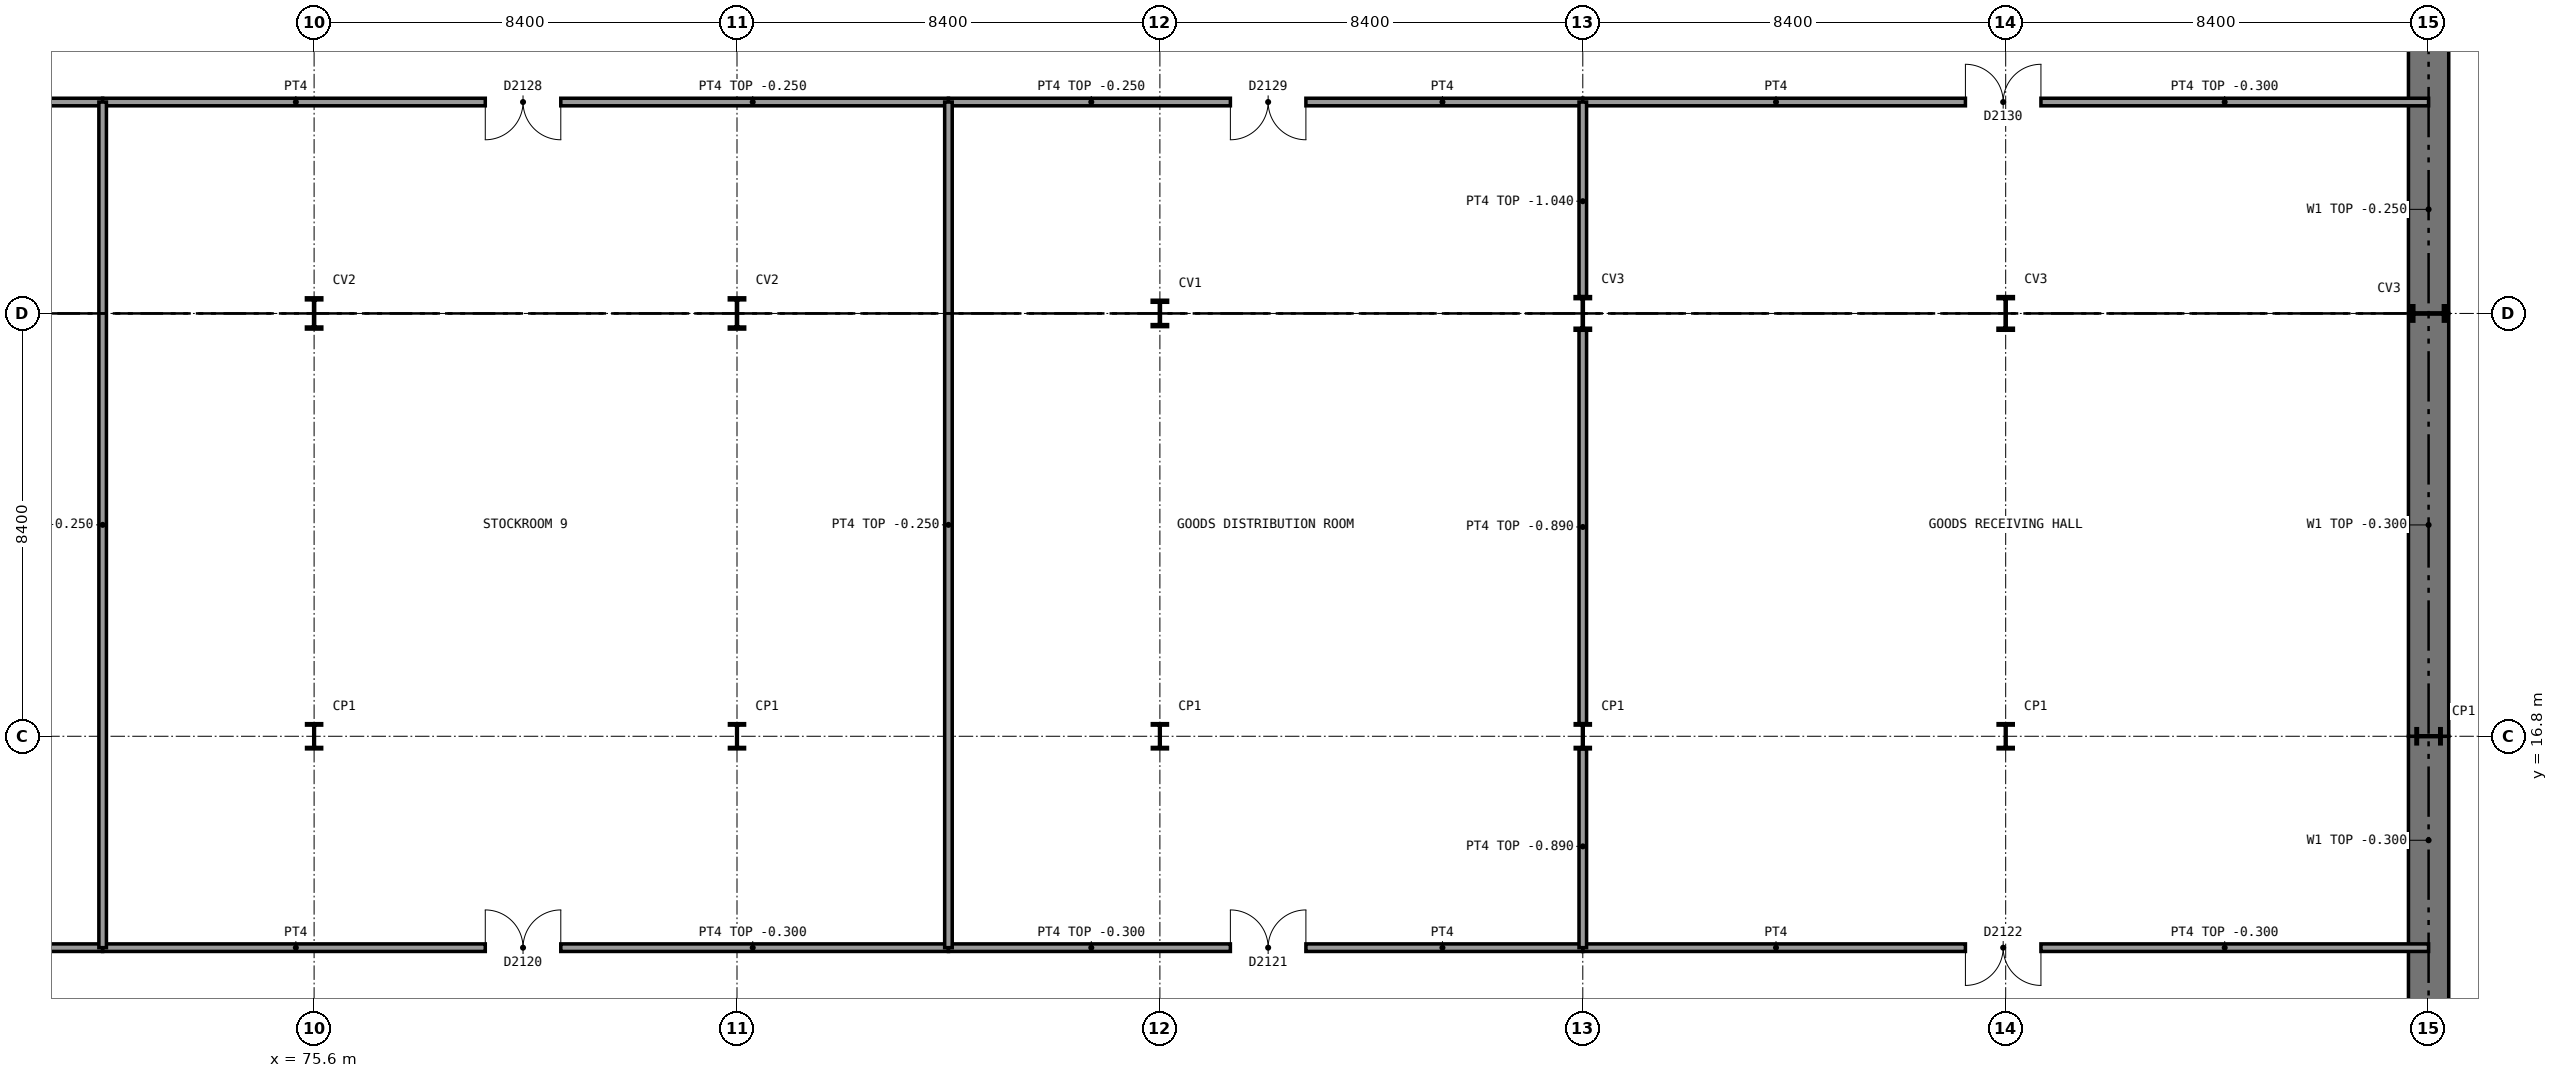
"""IFC4 building model, lengths in metres.
Left out: names, types, materials, properties, quantities, classifications, styles, units other than length and angle.
Written with IfcOpenShell. Run it as: python <this file> out.ifc"""

import sys

from ifc_helpers import new_model, si_unit, direction, frame, frame_2d, origin, origin_2d, place, context, subcontext, project, spatial, rectangle, i_section, extrude, element, fill, save


model = new_model("IFC4")
c1 = context("Model", 3, precision=1e-05, world=origin(), true_north=direction((0.0, 1.0)))
c2 = subcontext(c1, "Body", "Model", "MODEL_VIEW")
j1 = project(units=[si_unit("LENGTHUNIT", "METRE"), si_unit("PLANEANGLEUNIT", "RADIAN")], contexts=[c1])
p1 = place(None, origin())
s1 = spatial("IfcSite", under=j1, at=p1, CompositionType="ELEMENT")
p2 = place(p1, origin())
s2 = spatial("IfcBuilding", under=s1, at=p2, CompositionType="ELEMENT")
p3 = place(p2, frame((0.0, 0.0, -4.9)))
s3 = spatial("IfcBuildingStorey", under=s2, at=p3, CompositionType="ELEMENT", Elevation=-4.9)
p4 = place(p3, frame((117.6, 8.55, 0.0), z_axis=(0.0, 0.0, 1.0), x_axis=(0.0, 1.0, 0.0)))
e1 = element("IfcWall", 1, at=p4, inside=s3, PredefinedType="SOLIDWALL", context=c2, shape_type="SweptSolid", body=[
    extrude(rectangle(XDim=8.25, YDim=0.8, at=frame_2d((4.125, 0.0))), origin(), (0.0, 0.0, 1.0), 4.6),
])
p5 = place(p3, frame((117.6, 16.8, 0.0), z_axis=(0.0, 0.0, 1.0), x_axis=(0.0, 1.0, 0.0)))
e2 = element("IfcWall", 2, at=p5, inside=s3, PredefinedType="SOLIDWALL", context=c2, shape_type="SweptSolid", body=[
    extrude(rectangle(XDim=8.4, YDim=0.8, at=frame_2d((4.2, 0.0))), origin(), (0.0, 0.0, 1.0), 4.6),
])
p6 = place(p3, frame((117.6, 25.2, 0.0), z_axis=(0.0, 0.0, 1.0), x_axis=(0.0, 1.0, 0.0)))
e3 = element("IfcWall", 3, at=p6, inside=s3, PredefinedType="SOLIDWALL", context=c2, shape_type="SweptSolid", body=[
    extrude(rectangle(XDim=12.6, YDim=0.8, at=frame_2d((6.3, 0.0))), origin(), (0.0, 0.0, 1.0), 4.65),
])
p7 = place(p3, frame((75.6, 16.8, 0.0), z_axis=(0.0, 0.0, 1.0), x_axis=(1.0, 0.0, 0.0)))
e4 = element("IfcColumn", 4, at=p7, inside=s3, PredefinedType="COLUMN", context=c2, shape_type="SweptSolid", body=[
    extrude(i_section(OverallWidth=0.3, OverallDepth=0.5, WebThickness=0.014, FlangeThickness=0.028, FilletRadius=0.027, at=origin_2d()), origin(), (0.0, 0.0, 1.0), 4.9),
])
p8 = place(p3, frame((75.6, 25.2, 0.0), z_axis=(0.0, 0.0, 1.0), x_axis=(1.0, 0.0, 0.0)))
e5 = element("IfcColumn", 5, at=p8, inside=s3, PredefinedType="COLUMN", context=c2, shape_type="SweptSolid", body=[
    extrude(i_section(OverallWidth=0.305, OverallDepth=0.62, WebThickness=0.021, FlangeThickness=0.04, FilletRadius=0.027, at=origin_2d()), origin(), (0.0, 0.0, 1.0), 4.9),
])
p9 = place(p3, frame((84.0, 16.8, 0.0), z_axis=(0.0, 0.0, 1.0), x_axis=(1.0, 0.0, 0.0)))
e6 = element("IfcColumn", 6, at=p9, inside=s3, PredefinedType="COLUMN", context=c2, shape_type="SweptSolid", body=[
    extrude(i_section(OverallWidth=0.3, OverallDepth=0.5, WebThickness=0.014, FlangeThickness=0.028, FilletRadius=0.027, at=origin_2d()), origin(), (0.0, 0.0, 1.0), 4.9),
])
p10 = place(p3, frame((84.0, 25.2, 0.0), z_axis=(0.0, 0.0, 1.0), x_axis=(1.0, 0.0, 0.0)))
e7 = element("IfcColumn", 7, at=p10, inside=s3, PredefinedType="COLUMN", context=c2, shape_type="SweptSolid", body=[
    extrude(i_section(OverallWidth=0.305, OverallDepth=0.62, WebThickness=0.021, FlangeThickness=0.04, FilletRadius=0.027, at=origin_2d()), origin(), (0.0, 0.0, 1.0), 4.9),
])
p11 = place(p3, frame((92.4, 16.8, 0.0), z_axis=(0.0, 0.0, 1.0), x_axis=(1.0, 0.0, 0.0)))
e8 = element("IfcColumn", 8, at=p11, inside=s3, PredefinedType="COLUMN", context=c2, shape_type="SweptSolid", body=[
    extrude(i_section(OverallWidth=0.3, OverallDepth=0.5, WebThickness=0.014, FlangeThickness=0.028, FilletRadius=0.027, at=origin_2d()), origin(), (0.0, 0.0, 1.0), 4.9),
])
p12 = place(p3, frame((92.4, 25.2, 0.0), z_axis=(0.0, 0.0, 1.0), x_axis=(1.0, 0.0, 0.0)))
e9 = element("IfcColumn", 9, at=p12, inside=s3, PredefinedType="COLUMN", context=c2, shape_type="SweptSolid", body=[
    extrude(i_section(OverallWidth=0.306, OverallDepth=0.524, WebThickness=0.021, FlangeThickness=0.04, FilletRadius=0.027, at=origin_2d()), origin(), (0.0, 0.0, 1.0), 4.9),
])
p13 = place(p3, frame((100.8, 16.8, 0.0), z_axis=(0.0, 0.0, 1.0), x_axis=(1.0, 0.0, 0.0)))
e10 = element("IfcColumn", 10, at=p13, inside=s3, PredefinedType="COLUMN", context=c2, shape_type="SweptSolid", body=[
    extrude(i_section(OverallWidth=0.3, OverallDepth=0.5, WebThickness=0.014, FlangeThickness=0.028, FilletRadius=0.027, at=origin_2d()), origin(), (0.0, 0.0, 1.0), 4.9),
])
p14 = place(p3, frame((100.8, 25.2, 0.0), z_axis=(0.0, 0.0, 1.0), x_axis=(1.0, 0.0, 0.0)))
e11 = element("IfcColumn", 11, at=p14, inside=s3, PredefinedType="COLUMN", context=c2, shape_type="SweptSolid", body=[
    extrude(i_section(OverallWidth=0.305, OverallDepth=0.668, WebThickness=0.021, FlangeThickness=0.04, FilletRadius=0.027, at=origin_2d()), origin(), (0.0, 0.0, 1.0), 4.9),
])
p15 = place(p3, frame((109.2, 16.8, 0.0), z_axis=(0.0, 0.0, 1.0), x_axis=(1.0, 0.0, 0.0)))
e12 = element("IfcColumn", 12, at=p15, inside=s3, PredefinedType="COLUMN", context=c2, shape_type="SweptSolid", body=[
    extrude(i_section(OverallWidth=0.3, OverallDepth=0.5, WebThickness=0.014, FlangeThickness=0.028, FilletRadius=0.027, at=origin_2d()), origin(), (0.0, 0.0, 1.0), 4.9),
])
p16 = place(p3, frame((109.2, 25.2, 0.0), z_axis=(0.0, 0.0, 1.0), x_axis=(1.0, 0.0, 0.0)))
e13 = element("IfcColumn", 13, at=p16, inside=s3, PredefinedType="COLUMN", context=c2, shape_type="SweptSolid", body=[
    extrude(i_section(OverallWidth=0.305, OverallDepth=0.668, WebThickness=0.021, FlangeThickness=0.04, FilletRadius=0.027, at=origin_2d()), origin(), (0.0, 0.0, 1.0), 4.9),
])
p17 = place(p3, frame((117.6, 16.8, 0.0), z_axis=(0.0, 0.0, 1.0), x_axis=(0.0, 1.0, 0.0)))
e14 = element("IfcColumn", 14, at=p17, inside=s3, PredefinedType="COLUMN", context=c2, shape_type="SweptSolid", body=[
    extrude(i_section(OverallWidth=0.3, OverallDepth=0.5, WebThickness=0.014, FlangeThickness=0.028, FilletRadius=0.027, at=origin_2d()), origin(), (0.0, 0.0, 1.0), 4.9),
])
p18 = place(p3, frame((117.6, 25.2, 0.0), z_axis=(0.0, 0.0, 1.0), x_axis=(0.0, 1.0, 0.0)))
e15 = element("IfcColumn", 15, at=p18, inside=s3, PredefinedType="COLUMN", context=c2, shape_type="SweptSolid", body=[
    extrude(i_section(OverallWidth=0.305, OverallDepth=0.668, WebThickness=0.021, FlangeThickness=0.04, FilletRadius=0.027, at=origin_2d()), origin(), (0.0, 0.0, 1.0), 4.9),
])
p19 = place(p3, frame((58.8, 12.6, 0.0), z_axis=(0.0, 0.0, 1.0), x_axis=(1.0, 0.0, 0.0)))
e16 = element("IfcWall", 16, at=p19, inside=s3, PredefinedType="SOLIDWALL", context=c2, shape_type="SweptSolid", body=[
    extrude(rectangle(XDim=12.6, YDim=0.15, at=frame_2d((6.3, 0.0))), origin(), (0.0, 0.0, 1.0), 4.6),
])
p20 = place(p19, frame((5.6, 0.0, 0.0)))
e17 = element("IfcOpeningElement", 17, at=p20, cuts=e16, PredefinedType="OPENING", context=c2, shape_type="SweptSolid", body=[
    extrude(rectangle(XDim=1.5, YDim=2.1, at=frame_2d((0.75, 1.05))), frame((0.0, 0.085, 0.0), z_axis=(0.0, -1.0, 0.0), x_axis=(1.0, 0.0, 0.0)), (0.0, 0.0, 1.0), 0.17),
])
p21 = place(p3, frame((71.4, 12.6, 0.0), z_axis=(0.0, 0.0, 1.0), x_axis=(1.0, 0.0, 0.0)))
e18 = element("IfcWall", 18, at=p21, inside=s3, PredefinedType="SOLIDWALL", context=c2, shape_type="SweptSolid", body=[
    extrude(rectangle(XDim=16.8, YDim=0.15, at=frame_2d((8.4, 0.0))), origin(), (0.0, 0.0, 1.0), 4.6),
])
p22 = place(p21, frame((7.6, 0.0, 0.0)))
e19 = element("IfcOpeningElement", 19, at=p22, cuts=e18, PredefinedType="OPENING", context=c2, shape_type="SweptSolid", body=[
    extrude(rectangle(XDim=1.5, YDim=2.1, at=frame_2d((0.75, 1.05))), frame((0.0, 0.085, 0.0), z_axis=(0.0, -1.0, 0.0), x_axis=(1.0, 0.0, 0.0)), (0.0, 0.0, 1.0), 0.17),
])
p23 = place(p3, frame((88.2, 12.6, 0.0), z_axis=(0.0, 0.0, 1.0), x_axis=(1.0, 0.0, 0.0)))
e20 = element("IfcWall", 20, at=p23, inside=s3, PredefinedType="SOLIDWALL", context=c2, shape_type="SweptSolid", body=[
    extrude(rectangle(XDim=12.6, YDim=0.15, at=frame_2d((6.3, 0.0))), origin(), (0.0, 0.0, 1.0), 4.6),
])
p24 = place(p23, frame((5.6, 0.0, 0.0)))
e21 = element("IfcOpeningElement", 21, at=p24, cuts=e20, PredefinedType="OPENING", context=c2, shape_type="SweptSolid", body=[
    extrude(rectangle(XDim=1.5, YDim=2.1, at=frame_2d((0.75, 1.05))), frame((0.0, 0.085, 0.0), z_axis=(0.0, -1.0, 0.0), x_axis=(1.0, 0.0, 0.0)), (0.0, 0.0, 1.0), 0.17),
])
p25 = place(p3, frame((100.8, 12.6, 0.0), z_axis=(0.0, 0.0, 1.0), x_axis=(1.0, 0.0, 0.0)))
e22 = element("IfcWall", 22, at=p25, inside=s3, PredefinedType="SOLIDWALL", context=c2, shape_type="SweptSolid", body=[
    extrude(rectangle(XDim=16.8, YDim=0.15, at=frame_2d((8.4, 0.0))), origin(), (0.0, 0.0, 1.0), 4.6),
])
p26 = place(p25, frame((7.6, 0.0, 0.0)))
e23 = element("IfcOpeningElement", 23, at=p26, cuts=e22, PredefinedType="OPENING", context=c2, shape_type="SweptSolid", body=[
    extrude(rectangle(XDim=1.5, YDim=2.1, at=frame_2d((0.75, 1.05))), frame((0.0, 0.085, 0.0), z_axis=(0.0, -1.0, 0.0), x_axis=(1.0, 0.0, 0.0)), (0.0, 0.0, 1.0), 0.17),
])
p27 = place(p3, frame((58.8, 29.4, 0.0), z_axis=(0.0, 0.0, 1.0), x_axis=(1.0, 0.0, 0.0)))
e24 = element("IfcWall", 24, at=p27, inside=s3, PredefinedType="SOLIDWALL", context=c2, shape_type="SweptSolid", body=[
    extrude(rectangle(XDim=12.6, YDim=0.15, at=frame_2d((6.3, 0.0))), origin(), (0.0, 0.0, 1.0), 4.65),
])
p28 = place(p27, frame((5.6, 0.0, 0.0)))
e25 = element("IfcOpeningElement", 25, at=p28, cuts=e24, PredefinedType="OPENING", context=c2, shape_type="SweptSolid", body=[
    extrude(rectangle(XDim=1.5, YDim=2.1, at=frame_2d((0.75, 1.05))), frame((0.0, 0.085, 0.0), z_axis=(0.0, -1.0, 0.0), x_axis=(1.0, 0.0, 0.0)), (0.0, 0.0, 1.0), 0.17),
])
p29 = place(p3, frame((71.4, 29.4, 0.0), z_axis=(0.0, 0.0, 1.0), x_axis=(1.0, 0.0, 0.0)))
e26 = element("IfcWall", 26, at=p29, inside=s3, PredefinedType="SOLIDWALL", context=c2, shape_type="SweptSolid", body=[
    extrude(rectangle(XDim=16.8, YDim=0.15, at=frame_2d((8.4, 0.0))), origin(), (0.0, 0.0, 1.0), 4.65),
])
p30 = place(p29, frame((7.6, 0.0, 0.0)))
e27 = element("IfcOpeningElement", 27, at=p30, cuts=e26, PredefinedType="OPENING", context=c2, shape_type="SweptSolid", body=[
    extrude(rectangle(XDim=1.5, YDim=2.1, at=frame_2d((0.75, 1.05))), frame((0.0, 0.085, 0.0), z_axis=(0.0, -1.0, 0.0), x_axis=(1.0, 0.0, 0.0)), (0.0, 0.0, 1.0), 0.17),
])
p31 = place(p3, frame((88.2, 29.4, 0.0), z_axis=(0.0, 0.0, 1.0), x_axis=(1.0, 0.0, 0.0)))
e28 = element("IfcWall", 28, at=p31, inside=s3, PredefinedType="SOLIDWALL", context=c2, shape_type="SweptSolid", body=[
    extrude(rectangle(XDim=12.6, YDim=0.15, at=frame_2d((6.3, 0.0))), origin(), (0.0, 0.0, 1.0), 4.65),
])
p32 = place(p31, frame((5.6, 0.0, 0.0)))
e29 = element("IfcOpeningElement", 29, at=p32, cuts=e28, PredefinedType="OPENING", context=c2, shape_type="SweptSolid", body=[
    extrude(rectangle(XDim=1.5, YDim=2.1, at=frame_2d((0.75, 1.05))), frame((0.0, 0.085, 0.0), z_axis=(0.0, -1.0, 0.0), x_axis=(1.0, 0.0, 0.0)), (0.0, 0.0, 1.0), 0.17),
])
p33 = place(p3, frame((100.8, 29.4, 0.0), z_axis=(0.0, 0.0, 1.0), x_axis=(1.0, 0.0, 0.0)))
e30 = element("IfcWall", 30, at=p33, inside=s3, PredefinedType="SOLIDWALL", context=c2, shape_type="SweptSolid", body=[
    extrude(rectangle(XDim=16.8, YDim=0.15, at=frame_2d((8.4, 0.0))), origin(), (0.0, 0.0, 1.0), 4.6),
])
p34 = place(p33, frame((7.6, 0.0, 0.0)))
e31 = element("IfcOpeningElement", 31, at=p34, cuts=e30, PredefinedType="OPENING", context=c2, shape_type="SweptSolid", body=[
    extrude(rectangle(XDim=1.5, YDim=2.1, at=frame_2d((0.75, 1.05))), frame((0.0, 0.085, 0.0), z_axis=(0.0, -1.0, 0.0), x_axis=(1.0, 0.0, 0.0)), (0.0, 0.0, 1.0), 0.17),
])
for number, where, z_axis, x_axis in (
    (32, (71.4, 12.6, 0.0), (0.0, 0.0, 1.0), (0.0, 1.0, 0.0)),
    (33, (88.2, 12.6, 0.0), (0.0, 0.0, 1.0), (0.0, 1.0, 0.0)),
):
    element("IfcWall", number, at=place(p3, frame(where, z_axis=z_axis, x_axis=x_axis)), inside=s3, PredefinedType="SOLIDWALL", context=c2, shape_type="SweptSolid", body=[
        extrude(rectangle(XDim=16.8, YDim=0.15, at=frame_2d((8.4, 0.0))), origin(), (0.0, 0.0, 1.0), 4.65),
    ])
p35 = place(p3, frame((100.8, 12.6, 0.0), z_axis=(0.0, 0.0, 1.0), x_axis=(0.0, 1.0, 0.0)))
e34 = element("IfcWall", 34, at=p35, inside=s3, PredefinedType="SOLIDWALL", context=c2, shape_type="SweptSolid", body=[
    extrude(rectangle(XDim=3.95, YDim=0.15, at=frame_2d((1.975, 0.0))), origin(), (0.0, 0.0, 1.0), 4.01),
])
p36 = place(p3, frame((100.8, 17.05, 0.0), z_axis=(0.0, 0.0, 1.0), x_axis=(0.0, 1.0, 0.0)))
e35 = element("IfcWall", 35, at=p36, inside=s3, PredefinedType="SOLIDWALL", context=c2, shape_type="SweptSolid", body=[
    extrude(rectangle(XDim=7.816, YDim=0.15, at=frame_2d((3.908, 0.0))), origin(), (0.0, 0.0, 1.0), 4.01),
])
p37 = place(p3, frame((100.8, 25.534, 0.0), z_axis=(0.0, 0.0, 1.0), x_axis=(0.0, 1.0, 0.0)))
e36 = element("IfcWall", 36, at=p37, inside=s3, PredefinedType="SOLIDWALL", context=c2, shape_type="SweptSolid", body=[
    extrude(rectangle(XDim=3.866, YDim=0.15, at=frame_2d((1.933, 0.0))), origin(), (0.0, 0.0, 1.0), 3.86),
])
p38 = place(p22, origin())
e37 = element("IfcDoor", 37, at=p38, inside=s3, OperationType="DOUBLE_DOOR_SINGLE_SWING", PredefinedType="DOOR", context=c2, shape_type="SweptSolid", body=[
    extrude(rectangle(XDim=1.5, YDim=2.1, at=frame_2d((0.75, 1.05))), frame((0.0, 0.025, 0.0), z_axis=(0.0, -1.0, 0.0), x_axis=(1.0, 0.0, 0.0)), (0.0, 0.0, 1.0), 0.05),
])
fill(e19, e37)
p39 = place(p24, origin())
e38 = element("IfcDoor", 38, at=p39, inside=s3, OperationType="DOUBLE_DOOR_SINGLE_SWING", PredefinedType="DOOR", context=c2, shape_type="SweptSolid", body=[
    extrude(rectangle(XDim=1.5, YDim=2.1, at=frame_2d((0.75, 1.05))), frame((0.0, 0.025, 0.0), z_axis=(0.0, -1.0, 0.0), x_axis=(1.0, 0.0, 0.0)), (0.0, 0.0, 1.0), 0.05),
])
fill(e21, e38)
p40 = place(p26, frame((1.5, 0.0, 0.0), z_axis=(0.0, 0.0, 1.0), x_axis=(-1.0, 0.0, 0.0)))
e39 = element("IfcDoor", 39, at=p40, inside=s3, OperationType="DOUBLE_DOOR_SINGLE_SWING", PredefinedType="DOOR", context=c2, shape_type="SweptSolid", body=[
    extrude(rectangle(XDim=1.5, YDim=2.1, at=frame_2d((0.75, 1.05))), frame((0.0, 0.025, 0.0), z_axis=(0.0, -1.0, 0.0), x_axis=(1.0, 0.0, 0.0)), (0.0, 0.0, 1.0), 0.05),
])
fill(e23, e39)
p41 = place(p30, frame((1.5, 0.0, 0.0), z_axis=(0.0, 0.0, 1.0), x_axis=(-1.0, 0.0, 0.0)))
e40 = element("IfcDoor", 40, at=p41, inside=s3, OperationType="DOUBLE_DOOR_SINGLE_SWING", PredefinedType="DOOR", context=c2, shape_type="SweptSolid", body=[
    extrude(rectangle(XDim=1.5, YDim=2.1, at=frame_2d((0.75, 1.05))), frame((0.0, 0.025, 0.0), z_axis=(0.0, -1.0, 0.0), x_axis=(1.0, 0.0, 0.0)), (0.0, 0.0, 1.0), 0.05),
])
fill(e27, e40)
p42 = place(p32, frame((1.5, 0.0, 0.0), z_axis=(0.0, 0.0, 1.0), x_axis=(-1.0, 0.0, 0.0)))
e41 = element("IfcDoor", 41, at=p42, inside=s3, OperationType="DOUBLE_DOOR_SINGLE_SWING", PredefinedType="DOOR", context=c2, shape_type="SweptSolid", body=[
    extrude(rectangle(XDim=1.5, YDim=2.1, at=frame_2d((0.75, 1.05))), frame((0.0, 0.025, 0.0), z_axis=(0.0, -1.0, 0.0), x_axis=(1.0, 0.0, 0.0)), (0.0, 0.0, 1.0), 0.05),
])
fill(e29, e41)
p43 = place(p34, origin())
e42 = element("IfcDoor", 42, at=p43, inside=s3, OperationType="DOUBLE_DOOR_SINGLE_SWING", PredefinedType="DOOR", context=c2, shape_type="SweptSolid", body=[
    extrude(rectangle(XDim=1.5, YDim=2.1, at=frame_2d((0.75, 1.05))), frame((0.0, 0.025, 0.0), z_axis=(0.0, -1.0, 0.0), x_axis=(1.0, 0.0, 0.0)), (0.0, 0.0, 1.0), 0.05),
])
fill(e31, e42)
save(model, sys.argv[1])
